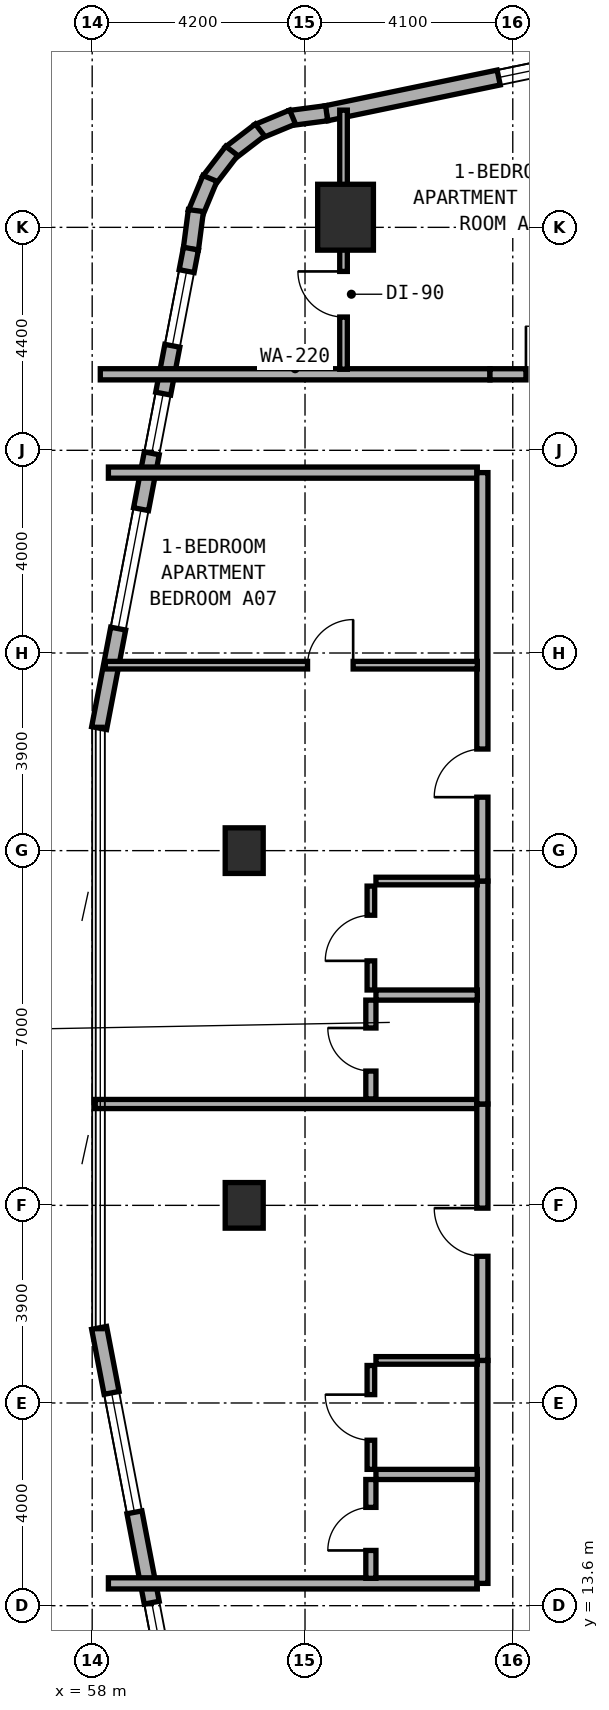
"""IFC4 building model, lengths in metres.
Left out: names, types, materials, properties, quantities, classifications, styles, units other than length and angle.
Written with IfcOpenShell. Run it as: python <this file> out.ifc"""

import sys

from ifc_helpers import new_model, si_unit, direction, frame, frame_2d, origin, origin_2d, place, context, subcontext, project, spatial, rectangle, extrude, element, fill, save


model = new_model("IFC4")
c1 = context("Model", 3, precision=1e-05, world=origin(), true_north=direction((0.0, 1.0)))
c2 = subcontext(c1, "Body", "Model", "MODEL_VIEW")
j1 = project(units=[si_unit("LENGTHUNIT", "METRE"), si_unit("PLANEANGLEUNIT", "RADIAN")], contexts=[c1])
p1 = place(None, origin())
s1 = spatial("IfcSite", under=j1, at=p1, CompositionType="ELEMENT")
p2 = place(p1, origin())
s2 = spatial("IfcBuilding", under=s1, at=p2, CompositionType="ELEMENT")
p3 = place(p2, frame((0.0, 0.0, 38.0)))
s3 = spatial("IfcBuildingStorey", under=s2, at=p3, CompositionType="ELEMENT", Elevation=38.0)
for number, where, z_axis, x_axis in (
    (1, (61.0, 21.5, 0.0), (0.0, 0.0, 1.0), (1.0, 0.0, 0.0)),
    (2, (61.0, 28.5, 0.0), (0.0, 0.0, 1.0), (1.0, 0.0, 0.0)),
):
    element("IfcColumn", number, at=place(p3, frame(where, z_axis=z_axis, x_axis=x_axis)), inside=s3, PredefinedType="COLUMN", context=c2, shape_type="SweptSolid", body=[
        extrude(rectangle(XDim=0.75, YDim=0.9, at=origin_2d()), origin(), (0.0, 0.0, 1.0), 3.5),
    ])
p4 = place(p3, frame((63.0, 41.0, 0.0), z_axis=(0.0, 0.0, 1.0), x_axis=(1.0, 0.0, 0.0)))
e3 = element("IfcColumn", 3, at=p4, inside=s3, PredefinedType="COLUMN", context=c2, shape_type="SweptSolid", body=[
    extrude(rectangle(XDim=1.1, YDim=1.3, at=origin_2d()), origin(), (0.0, 0.0, 1.0), 3.5),
])
p5 = place(p3, frame((71.356, 44.864, 0.0), z_axis=(0.0, 0.0, 1.0), x_axis=(-0.979127260729, -0.203248142175, 0.0)))
e4 = element("IfcWall", 4, at=p5, inside=s3, PredefinedType="STANDARD", context=c2, shape_type="SweptSolid", body=[
    extrude(rectangle(XDim=8.92, YDim=0.3, at=frame_2d((4.46, 0.0))), origin(), (0.0, 0.0, 1.0), 3.25),
])
p6 = place(p5, frame((3.048, 0.0, 0.8)))
e5 = element("IfcOpeningElement", 5, at=p6, cuts=e4, PredefinedType="OPENING", context=c2, shape_type="SweptSolid", body=[
    extrude(rectangle(XDim=2.4, YDim=1.6, at=frame_2d((1.2, 0.8))), frame((0.0, 0.16, 0.0), z_axis=(0.0, -1.0, 0.0), x_axis=(1.0, 0.0, 0.0)), (0.0, 0.0, 1.0), 0.32),
])
p7 = place(p3, frame((62.627, 43.052, 0.0), z_axis=(0.0, 0.0, 1.0), x_axis=(-0.991480488834, -0.130255288807, 0.0)))
e6 = element("IfcWall", 6, at=p7, inside=s3, PredefinedType="STANDARD", context=c2, shape_type="SweptSolid", body=[
    extrude(rectangle(XDim=0.729, YDim=0.3, at=frame_2d((0.365, 0.0))), origin(), (0.0, 0.0, 1.0), 3.25),
])
for number, where, z_axis, x_axis in (
    (7, (61.955, 42.976, 0.0), (0.0, 0.0, 1.0), (-0.924, -0.384, 0.0)),
    (8, (61.311, 42.721, 0.0), (0.0, 0.0, 1.0), (-0.794, -0.608, 0.0)),
    (9, (60.754, 42.309, 0.0), (0.0, 0.0, 1.0), (-0.608, -0.794, 0.0)),
    (10, (60.324, 41.766, 0.0), (0.0, 0.0, 1.0), (-0.383, -0.924, 0.0)),
):
    element("IfcWall", number, at=place(p3, frame(where, z_axis=z_axis, x_axis=x_axis)), inside=s3, PredefinedType="STANDARD", context=c2, shape_type="SweptSolid", body=[
        extrude(rectangle(XDim=0.746, YDim=0.3, at=frame_2d((0.373, 0.0))), origin(), (0.0, 0.0, 1.0), 3.25),
    ])
p8 = place(p3, frame((60.047, 41.131, 0.0), z_axis=(0.0, 0.0, 1.0), x_axis=(-0.129653178221, -0.991559404866, 0.0)))
e11 = element("IfcWall", 11, at=p8, inside=s3, PredefinedType="STANDARD", context=c2, shape_type="SweptSolid", body=[
    extrude(rectangle(XDim=0.764, YDim=0.3, at=frame_2d((0.382, 0.0))), origin(), (0.0, 0.0, 1.0), 3.25),
])
p9 = place(p3, frame((59.949, 40.38, 0.0), z_axis=(0.0, 0.0, 1.0), x_axis=(-0.188087874316, -0.982152203854, 0.0)))
e12 = element("IfcWall", 12, at=p9, inside=s3, PredefinedType="STANDARD", context=c2, shape_type="SweptSolid", body=[
    extrude(rectangle(XDim=9.634, YDim=0.3, at=frame_2d((4.817, 0.0))), origin(), (0.0, 0.0, 1.0), 3.25),
])
p10 = place(p9, frame((0.452, 0.0, 0.85)))
e13 = element("IfcOpeningElement", 13, at=p10, cuts=e12, PredefinedType="OPENING", context=c2, shape_type="SweptSolid", body=[
    extrude(rectangle(XDim=1.5, YDim=1.5, at=frame_2d((0.75, 0.75))), frame((0.0, 0.16, 0.0), z_axis=(0.0, -1.0, 0.0), x_axis=(1.0, 0.0, 0.0)), (0.0, 0.0, 1.0), 0.32),
])
p11 = place(p9, frame((2.913, 0.0, 0.85)))
e14 = element("IfcOpeningElement", 14, at=p11, cuts=e12, PredefinedType="OPENING", context=c2, shape_type="SweptSolid", body=[
    extrude(rectangle(XDim=1.2, YDim=1.5, at=frame_2d((0.6, 0.75))), frame((0.0, 0.16, 0.0), z_axis=(0.0, -1.0, 0.0), x_axis=(1.0, 0.0, 0.0)), (0.0, 0.0, 1.0), 0.32),
])
p12 = place(p9, frame((5.235, 0.0, 0.8)))
e15 = element("IfcOpeningElement", 15, at=p12, cuts=e12, PredefinedType="OPENING", context=c2, shape_type="SweptSolid", body=[
    extrude(rectangle(XDim=2.4, YDim=1.6, at=frame_2d((1.2, 0.8))), frame((0.0, 0.16, 0.0), z_axis=(0.0, -1.0, 0.0), x_axis=(1.0, 0.0, 0.0)), (0.0, 0.0, 1.0), 0.32),
])
p13 = place(p3, frame((58.137, 19.082, 0.0), z_axis=(0.0, 0.0, 1.0), x_axis=(0.188087874316, -0.982152203854, 0.0)))
e16 = element("IfcWall", 16, at=p13, inside=s3, PredefinedType="STANDARD", context=c2, shape_type="SweptSolid", body=[
    extrude(rectangle(XDim=9.634, YDim=0.3, at=frame_2d((4.817, 0.0))), origin(), (0.0, 0.0, 1.0), 3.25),
])
p14 = place(p13, frame((1.306, 0.0, 0.8)))
e17 = element("IfcOpeningElement", 17, at=p14, cuts=e16, PredefinedType="OPENING", context=c2, shape_type="SweptSolid", body=[
    extrude(rectangle(XDim=2.4, YDim=1.6, at=frame_2d((1.2, 0.8))), frame((0.0, 0.16, 0.0), z_axis=(0.0, -1.0, 0.0), x_axis=(1.0, 0.0, 0.0)), (0.0, 0.0, 1.0), 0.32),
])
p15 = place(p13, frame((5.521, 0.0, 0.85)))
e18 = element("IfcOpeningElement", 18, at=p15, cuts=e16, PredefinedType="OPENING", context=c2, shape_type="SweptSolid", body=[
    extrude(rectangle(XDim=1.2, YDim=1.5, at=frame_2d((0.6, 0.75))), frame((0.0, 0.16, 0.0), z_axis=(0.0, -1.0, 0.0), x_axis=(1.0, 0.0, 0.0)), (0.0, 0.0, 1.0), 0.32),
])
p16 = place(p13, frame((7.682, 0.0, 0.85)))
e19 = element("IfcOpeningElement", 19, at=p16, cuts=e16, PredefinedType="OPENING", context=c2, shape_type="SweptSolid", body=[
    extrude(rectangle(XDim=1.5, YDim=1.5, at=frame_2d((0.75, 0.75))), frame((0.0, 0.16, 0.0), z_axis=(0.0, -1.0, 0.0), x_axis=(1.0, 0.0, 0.0)), (0.0, 0.0, 1.0), 0.32),
])
p17 = place(p3, frame((58.16, 37.9, 0.0), z_axis=(0.0, 0.0, 1.0), x_axis=(1.0, 0.0, 0.0)))
e20 = element("IfcWall", 20, at=p17, inside=s3, PredefinedType="SOLIDWALL", context=c2, shape_type="SweptSolid", body=[
    extrude(rectangle(XDim=7.69, YDim=0.22, at=frame_2d((3.845, 0.0))), origin(), (0.0, 0.0, 1.0), 2.865),
])
p18 = place(p3, frame((65.85, 37.9, 0.0), z_axis=(0.0, 0.0, 1.0), x_axis=(1.0, 0.0, 0.0)))
e21 = element("IfcWall", 21, at=p18, inside=s3, PredefinedType="SOLIDWALL", context=c2, shape_type="SweptSolid", body=[
    extrude(rectangle(XDim=2.37, YDim=0.22, at=frame_2d((1.185, 0.0))), origin(), (0.0, 0.0, 1.0), 3.22),
])
p19 = place(p18, frame((0.71, 0.0, 0.0)))
e22 = element("IfcOpeningElement", 22, at=p19, cuts=e21, PredefinedType="OPENING", context=c2, shape_type="SweptSolid", body=[
    extrude(rectangle(XDim=0.95, YDim=2.1, at=frame_2d((0.475, 1.05))), frame((0.0, 0.12, 0.0), z_axis=(0.0, -1.0, 0.0), x_axis=(1.0, 0.0, 0.0)), (0.0, 0.0, 1.0), 0.24),
])
p20 = place(p3, frame((62.96, 38.0, 0.0), z_axis=(0.0, 0.0, 1.0), x_axis=(0.0, 1.0, 0.0)))
e23 = element("IfcWall", 23, at=p20, inside=s3, PredefinedType="PARTITIONING", context=c2, shape_type="SweptSolid", body=[
    extrude(rectangle(XDim=5.113, YDim=0.15, at=frame_2d((2.557, 0.0))), origin(), (0.0, 0.0, 1.0), 2.865),
])
p21 = place(p20, frame((1.03, 0.0, 0.0)))
e24 = element("IfcOpeningElement", 24, at=p21, cuts=e23, PredefinedType="OPENING", context=c2, shape_type="SweptSolid", body=[
    extrude(rectangle(XDim=0.9, YDim=2.1, at=frame_2d((0.45, 1.05))), frame((0.0, 0.085, 0.0), z_axis=(0.0, -1.0, 0.0), x_axis=(1.0, 0.0, 0.0)), (0.0, 0.0, 1.0), 0.17),
])
for number, where, z_axis, x_axis in (
    (25, (58.32, 14.04, 0.0), (0.0, 0.0, 1.0), (1.0, 0.0, 0.0)),
    (26, (58.32, 35.96, 0.0), (0.0, 0.0, 1.0), (1.0, 0.0, 0.0)),
):
    element("IfcWall", number, at=place(p3, frame(where, z_axis=z_axis, x_axis=x_axis)), inside=s3, PredefinedType="SOLIDWALL", context=c2, shape_type="SweptSolid", body=[
        extrude(rectangle(XDim=7.28, YDim=0.22, at=frame_2d((3.64, 0.0))), origin(), (0.0, 0.0, 1.0), 2.865),
    ])
p22 = place(p3, frame((58.06, 23.5, 0.0), z_axis=(0.0, 0.0, 1.0), x_axis=(1.0, 0.0, 0.0)))
e27 = element("IfcWall", 27, at=p22, inside=s3, PredefinedType="SOLIDWALL", context=c2, shape_type="SweptSolid", body=[
    extrude(rectangle(XDim=7.64, YDim=0.18, at=frame_2d((3.82, 0.0))), origin(), (0.0, 0.0, 1.0), 2.865),
])
p23 = place(p3, frame((65.7, 14.04, 0.0), z_axis=(0.0, 0.0, 1.0), x_axis=(0.0, 1.0, 0.0)))
e28 = element("IfcWall", 28, at=p23, inside=s3, PredefinedType="SOLIDWALL", context=c2, shape_type="SweptSolid", body=[
    extrude(rectangle(XDim=4.4, YDim=0.22, at=frame_2d((2.2, 0.0))), origin(), (0.0, 0.0, 1.0), 3.22),
])
p24 = place(p3, frame((65.7, 18.44, 0.0), z_axis=(0.0, 0.0, 1.0), x_axis=(0.0, 1.0, 0.0)))
e29 = element("IfcWall", 29, at=p24, inside=s3, PredefinedType="SOLIDWALL", context=c2, shape_type="SweptSolid", body=[
    extrude(rectangle(XDim=5.06, YDim=0.22, at=frame_2d((2.53, 0.0))), origin(), (0.0, 0.0, 1.0), 2.725),
])
p25 = place(p24, frame((2.055, 0.0, 0.0)))
e30 = element("IfcOpeningElement", 30, at=p25, cuts=e29, PredefinedType="OPENING", context=c2, shape_type="SweptSolid", body=[
    extrude(rectangle(XDim=0.95, YDim=2.1, at=frame_2d((0.475, 1.05))), frame((0.0, 0.12, 0.0), z_axis=(0.0, -1.0, 0.0), x_axis=(1.0, 0.0, 0.0)), (0.0, 0.0, 1.0), 0.24),
])
p26 = place(p3, frame((63.6, 16.19, 0.0), z_axis=(0.0, 0.0, 1.0), x_axis=(1.0, 0.0, 0.0)))
e31 = element("IfcWall", 31, at=p26, inside=s3, PredefinedType="PLUMBINGWALL", context=c2, shape_type="SweptSolid", body=[
    extrude(rectangle(XDim=2.0, YDim=0.2, at=frame_2d((1.0, 0.0))), origin(), (0.0, 0.0, 1.0), 3.22),
])
p27 = place(p3, frame((63.6, 18.44, 0.0), z_axis=(0.0, 0.0, 1.0), x_axis=(1.0, 0.0, 0.0)))
e32 = element("IfcWall", 32, at=p27, inside=s3, PredefinedType="PARTITIONING", context=c2, shape_type="SweptSolid", body=[
    extrude(rectangle(XDim=2.0, YDim=0.15, at=frame_2d((1.0, 0.0))), origin(), (0.0, 0.0, 1.0), 3.22),
])
p28 = place(p3, frame((63.5, 14.14, 0.0), z_axis=(0.0, 0.0, 1.0), x_axis=(0.0, 1.0, 0.0)))
e33 = element("IfcWall", 33, at=p28, inside=s3, PredefinedType="PLUMBINGWALL", context=c2, shape_type="SweptSolid", body=[
    extrude(rectangle(XDim=1.95, YDim=0.2, at=frame_2d((0.975, 0.0))), origin(), (0.0, 0.0, 1.0), 3.22),
])
p29 = place(p28, frame((0.55, 0.0, 0.0)))
e34 = element("IfcOpeningElement", 34, at=p29, cuts=e33, PredefinedType="OPENING", context=c2, shape_type="SweptSolid", body=[
    extrude(rectangle(XDim=0.85, YDim=2.1, at=frame_2d((0.425, 1.05))), frame((0.0, 0.11, 0.0), z_axis=(0.0, -1.0, 0.0), x_axis=(1.0, 0.0, 0.0)), (0.0, 0.0, 1.0), 0.22),
])
p30 = place(p3, frame((63.5, 16.29, 0.0), z_axis=(0.0, 0.0, 1.0), x_axis=(0.0, 1.0, 0.0)))
e35 = element("IfcWall", 35, at=p30, inside=s3, PredefinedType="PARTITIONING", context=c2, shape_type="SweptSolid", body=[
    extrude(rectangle(XDim=2.05, YDim=0.15, at=frame_2d((1.025, 0.0))), origin(), (0.0, 0.0, 1.0), 3.22),
])
p31 = place(p30, frame((0.575, 0.0, 0.0)))
e36 = element("IfcOpeningElement", 36, at=p31, cuts=e35, PredefinedType="OPENING", context=c2, shape_type="SweptSolid", body=[
    extrude(rectangle(XDim=0.9, YDim=2.1, at=frame_2d((0.45, 1.05))), frame((0.0, 0.085, 0.0), z_axis=(0.0, -1.0, 0.0), x_axis=(1.0, 0.0, 0.0)), (0.0, 0.0, 1.0), 0.17),
])
p32 = place(p3, frame((65.7, 23.5, 0.0), z_axis=(0.0, 0.0, 1.0), x_axis=(0.0, 1.0, 0.0)))
e37 = element("IfcWall", 37, at=p32, inside=s3, PredefinedType="SOLIDWALL", context=c2, shape_type="SweptSolid", body=[
    extrude(rectangle(XDim=4.4, YDim=0.22, at=frame_2d((2.2, 0.0))), origin(), (0.0, 0.0, 1.0), 3.22),
])
p33 = place(p3, frame((65.7, 27.9, 0.0), z_axis=(0.0, 0.0, 1.0), x_axis=(0.0, 1.0, 0.0)))
e38 = element("IfcWall", 38, at=p33, inside=s3, PredefinedType="SOLIDWALL", context=c2, shape_type="SweptSolid", body=[
    extrude(rectangle(XDim=8.06, YDim=0.22, at=frame_2d((4.03, 0.0))), origin(), (0.0, 0.0, 1.0), 2.725),
])
p34 = place(p33, frame((1.655, 0.0, 0.0)))
e39 = element("IfcOpeningElement", 39, at=p34, cuts=e38, PredefinedType="OPENING", context=c2, shape_type="SweptSolid", body=[
    extrude(rectangle(XDim=0.95, YDim=2.1, at=frame_2d((0.475, 1.05))), frame((0.0, 0.12, 0.0), z_axis=(0.0, -1.0, 0.0), x_axis=(1.0, 0.0, 0.0)), (0.0, 0.0, 1.0), 0.24),
])
p35 = place(p3, frame((58.26, 32.16, 0.0), z_axis=(0.0, 0.0, 1.0), x_axis=(1.0, 0.0, 0.0)))
e40 = element("IfcWall", 40, at=p35, inside=s3, PredefinedType="PARTITIONING", context=c2, shape_type="SweptSolid", body=[
    extrude(rectangle(XDim=7.34, YDim=0.15, at=frame_2d((3.67, 0.0))), origin(), (0.0, 0.0, 1.0), 2.865),
])
p36 = place(p35, frame((3.99, 0.0, 0.0)))
e41 = element("IfcOpeningElement", 41, at=p36, cuts=e40, PredefinedType="OPENING", context=c2, shape_type="SweptSolid", body=[
    extrude(rectangle(XDim=0.9, YDim=2.1, at=frame_2d((0.45, 1.05))), frame((0.0, 0.085, 0.0), z_axis=(0.0, -1.0, 0.0), x_axis=(1.0, 0.0, 0.0)), (0.0, 0.0, 1.0), 0.17),
])
p37 = place(p3, frame((63.6, 25.65, 0.0), z_axis=(0.0, 0.0, 1.0), x_axis=(1.0, 0.0, 0.0)))
e42 = element("IfcWall", 42, at=p37, inside=s3, PredefinedType="PLUMBINGWALL", context=c2, shape_type="SweptSolid", body=[
    extrude(rectangle(XDim=2.0, YDim=0.2, at=frame_2d((1.0, 0.0))), origin(), (0.0, 0.0, 1.0), 3.22),
])
p38 = place(p3, frame((63.6, 27.9, 0.0), z_axis=(0.0, 0.0, 1.0), x_axis=(1.0, 0.0, 0.0)))
e43 = element("IfcWall", 43, at=p38, inside=s3, PredefinedType="PARTITIONING", context=c2, shape_type="SweptSolid", body=[
    extrude(rectangle(XDim=2.0, YDim=0.15, at=frame_2d((1.0, 0.0))), origin(), (0.0, 0.0, 1.0), 3.22),
])
p39 = place(p3, frame((63.5, 23.6, 0.0), z_axis=(0.0, 0.0, 1.0), x_axis=(0.0, 1.0, 0.0)))
e44 = element("IfcWall", 44, at=p39, inside=s3, PredefinedType="PLUMBINGWALL", context=c2, shape_type="SweptSolid", body=[
    extrude(rectangle(XDim=1.95, YDim=0.2, at=frame_2d((0.975, 0.0))), origin(), (0.0, 0.0, 1.0), 3.22),
])
p40 = place(p39, frame((0.55, 0.0, 0.0)))
e45 = element("IfcOpeningElement", 45, at=p40, cuts=e44, PredefinedType="OPENING", context=c2, shape_type="SweptSolid", body=[
    extrude(rectangle(XDim=0.85, YDim=2.1, at=frame_2d((0.425, 1.05))), frame((0.0, 0.11, 0.0), z_axis=(0.0, -1.0, 0.0), x_axis=(1.0, 0.0, 0.0)), (0.0, 0.0, 1.0), 0.22),
])
p41 = place(p3, frame((63.5, 25.75, 0.0), z_axis=(0.0, 0.0, 1.0), x_axis=(0.0, 1.0, 0.0)))
e46 = element("IfcWall", 46, at=p41, inside=s3, PredefinedType="PARTITIONING", context=c2, shape_type="SweptSolid", body=[
    extrude(rectangle(XDim=2.05, YDim=0.15, at=frame_2d((1.025, 0.0))), origin(), (0.0, 0.0, 1.0), 3.22),
])
p42 = place(p41, frame((0.575, 0.0, 0.0)))
e47 = element("IfcOpeningElement", 47, at=p42, cuts=e46, PredefinedType="OPENING", context=c2, shape_type="SweptSolid", body=[
    extrude(rectangle(XDim=0.9, YDim=2.1, at=frame_2d((0.45, 1.05))), frame((0.0, 0.085, 0.0), z_axis=(0.0, -1.0, 0.0), x_axis=(1.0, 0.0, 0.0)), (0.0, 0.0, 1.0), 0.17),
])
p43 = place(p6, origin())
e48 = element("IfcWindow", 48, at=p43, inside=s3, PartitioningType="SINGLE_PANEL", PredefinedType="WINDOW", context=c2, shape_type="SweptSolid", body=[
    extrude(rectangle(XDim=2.4, YDim=1.6, at=frame_2d((1.2, 0.8))), frame((0.0, 0.03, 0.0), z_axis=(0.0, -1.0, 0.0), x_axis=(1.0, 0.0, 0.0)), (0.0, 0.0, 1.0), 0.06),
])
fill(e5, e48)
p44 = place(p10, origin())
e49 = element("IfcWindow", 49, at=p44, inside=s3, PartitioningType="SINGLE_PANEL", PredefinedType="WINDOW", context=c2, shape_type="SweptSolid", body=[
    extrude(rectangle(XDim=1.5, YDim=1.5, at=frame_2d((0.75, 0.75))), frame((0.0, 0.03, 0.0), z_axis=(0.0, -1.0, 0.0), x_axis=(1.0, 0.0, 0.0)), (0.0, 0.0, 1.0), 0.06),
])
fill(e13, e49)
p45 = place(p11, origin())
e50 = element("IfcWindow", 50, at=p45, inside=s3, PartitioningType="SINGLE_PANEL", PredefinedType="WINDOW", context=c2, shape_type="SweptSolid", body=[
    extrude(rectangle(XDim=1.2, YDim=1.5, at=frame_2d((0.6, 0.75))), frame((0.0, 0.03, 0.0), z_axis=(0.0, -1.0, 0.0), x_axis=(1.0, 0.0, 0.0)), (0.0, 0.0, 1.0), 0.06),
])
fill(e14, e50)
p46 = place(p12, origin())
e51 = element("IfcWindow", 51, at=p46, inside=s3, PartitioningType="SINGLE_PANEL", PredefinedType="WINDOW", context=c2, shape_type="SweptSolid", body=[
    extrude(rectangle(XDim=2.4, YDim=1.6, at=frame_2d((1.2, 0.8))), frame((0.0, 0.03, 0.0), z_axis=(0.0, -1.0, 0.0), x_axis=(1.0, 0.0, 0.0)), (0.0, 0.0, 1.0), 0.06),
])
fill(e15, e51)
p47 = place(p14, origin())
e52 = element("IfcWindow", 52, at=p47, inside=s3, PartitioningType="SINGLE_PANEL", PredefinedType="WINDOW", context=c2, shape_type="SweptSolid", body=[
    extrude(rectangle(XDim=2.4, YDim=1.6, at=frame_2d((1.2, 0.8))), frame((0.0, 0.03, 0.0), z_axis=(0.0, -1.0, 0.0), x_axis=(1.0, 0.0, 0.0)), (0.0, 0.0, 1.0), 0.06),
])
fill(e17, e52)
p48 = place(p15, origin())
e53 = element("IfcWindow", 53, at=p48, inside=s3, PartitioningType="SINGLE_PANEL", PredefinedType="WINDOW", context=c2, shape_type="SweptSolid", body=[
    extrude(rectangle(XDim=1.2, YDim=1.5, at=frame_2d((0.6, 0.75))), frame((0.0, 0.03, 0.0), z_axis=(0.0, -1.0, 0.0), x_axis=(1.0, 0.0, 0.0)), (0.0, 0.0, 1.0), 0.06),
])
fill(e18, e53)
p49 = place(p19, origin())
e54 = element("IfcDoor", 54, at=p49, inside=s3, OperationType="SINGLE_SWING_LEFT", PredefinedType="DOOR", context=c2, shape_type="SweptSolid", body=[
    extrude(rectangle(XDim=0.95, YDim=2.1, at=frame_2d((0.475, 1.05))), frame((0.0, 0.025, 0.0), z_axis=(0.0, -1.0, 0.0), x_axis=(1.0, 0.0, 0.0)), (0.0, 0.0, 1.0), 0.05),
])
fill(e22, e54)
p50 = place(p21, origin())
e55 = element("IfcDoor", 55, at=p50, inside=s3, OperationType="SINGLE_SWING_RIGHT", PredefinedType="DOOR", context=c2, shape_type="SweptSolid", body=[
    extrude(rectangle(XDim=0.9, YDim=2.1, at=frame_2d((0.45, 1.05))), frame((0.0, 0.025, 0.0), z_axis=(0.0, -1.0, 0.0), x_axis=(1.0, 0.0, 0.0)), (0.0, 0.0, 1.0), 0.05),
])
fill(e24, e55)
p51 = place(p25, origin())
e56 = element("IfcDoor", 56, at=p51, inside=s3, OperationType="SINGLE_SWING_RIGHT", PredefinedType="DOOR", context=c2, shape_type="SweptSolid", body=[
    extrude(rectangle(XDim=0.95, YDim=2.1, at=frame_2d((0.475, 1.05))), frame((0.0, 0.025, 0.0), z_axis=(0.0, -1.0, 0.0), x_axis=(1.0, 0.0, 0.0)), (0.0, 0.0, 1.0), 0.05),
])
fill(e30, e56)
p52 = place(p29, origin())
e57 = element("IfcDoor", 57, at=p52, inside=s3, OperationType="SINGLE_SWING_LEFT", PredefinedType="DOOR", context=c2, shape_type="SweptSolid", body=[
    extrude(rectangle(XDim=0.85, YDim=2.1, at=frame_2d((0.425, 1.05))), frame((0.0, 0.025, 0.0), z_axis=(0.0, -1.0, 0.0), x_axis=(1.0, 0.0, 0.0)), (0.0, 0.0, 1.0), 0.05),
])
fill(e34, e57)
p53 = place(p31, origin())
e58 = element("IfcDoor", 58, at=p53, inside=s3, OperationType="SINGLE_SWING_RIGHT", PredefinedType="DOOR", context=c2, shape_type="SweptSolid", body=[
    extrude(rectangle(XDim=0.9, YDim=2.1, at=frame_2d((0.45, 1.05))), frame((0.0, 0.025, 0.0), z_axis=(0.0, -1.0, 0.0), x_axis=(1.0, 0.0, 0.0)), (0.0, 0.0, 1.0), 0.05),
])
fill(e36, e58)
p54 = place(p34, origin())
e59 = element("IfcDoor", 59, at=p54, inside=s3, OperationType="SINGLE_SWING_LEFT", PredefinedType="DOOR", context=c2, shape_type="SweptSolid", body=[
    extrude(rectangle(XDim=0.95, YDim=2.1, at=frame_2d((0.475, 1.05))), frame((0.0, 0.025, 0.0), z_axis=(0.0, -1.0, 0.0), x_axis=(1.0, 0.0, 0.0)), (0.0, 0.0, 1.0), 0.05),
])
fill(e39, e59)
p55 = place(p36, origin())
e60 = element("IfcDoor", 60, at=p55, inside=s3, OperationType="SINGLE_SWING_RIGHT", PredefinedType="DOOR", context=c2, shape_type="SweptSolid", body=[
    extrude(rectangle(XDim=0.9, YDim=2.1, at=frame_2d((0.45, 1.05))), frame((0.0, 0.025, 0.0), z_axis=(0.0, -1.0, 0.0), x_axis=(1.0, 0.0, 0.0)), (0.0, 0.0, 1.0), 0.05),
])
fill(e41, e60)
p56 = place(p40, origin())
e61 = element("IfcDoor", 61, at=p56, inside=s3, OperationType="SINGLE_SWING_RIGHT", PredefinedType="DOOR", context=c2, shape_type="SweptSolid", body=[
    extrude(rectangle(XDim=0.85, YDim=2.1, at=frame_2d((0.425, 1.05))), frame((0.0, 0.025, 0.0), z_axis=(0.0, -1.0, 0.0), x_axis=(1.0, 0.0, 0.0)), (0.0, 0.0, 1.0), 0.05),
])
fill(e45, e61)
p57 = place(p42, origin())
e62 = element("IfcDoor", 62, at=p57, inside=s3, OperationType="SINGLE_SWING_LEFT", PredefinedType="DOOR", context=c2, shape_type="SweptSolid", body=[
    extrude(rectangle(XDim=0.9, YDim=2.1, at=frame_2d((0.45, 1.05))), frame((0.0, 0.025, 0.0), z_axis=(0.0, -1.0, 0.0), x_axis=(1.0, 0.0, 0.0)), (0.0, 0.0, 1.0), 0.05),
])
fill(e47, e62)
save(model, sys.argv[1])
